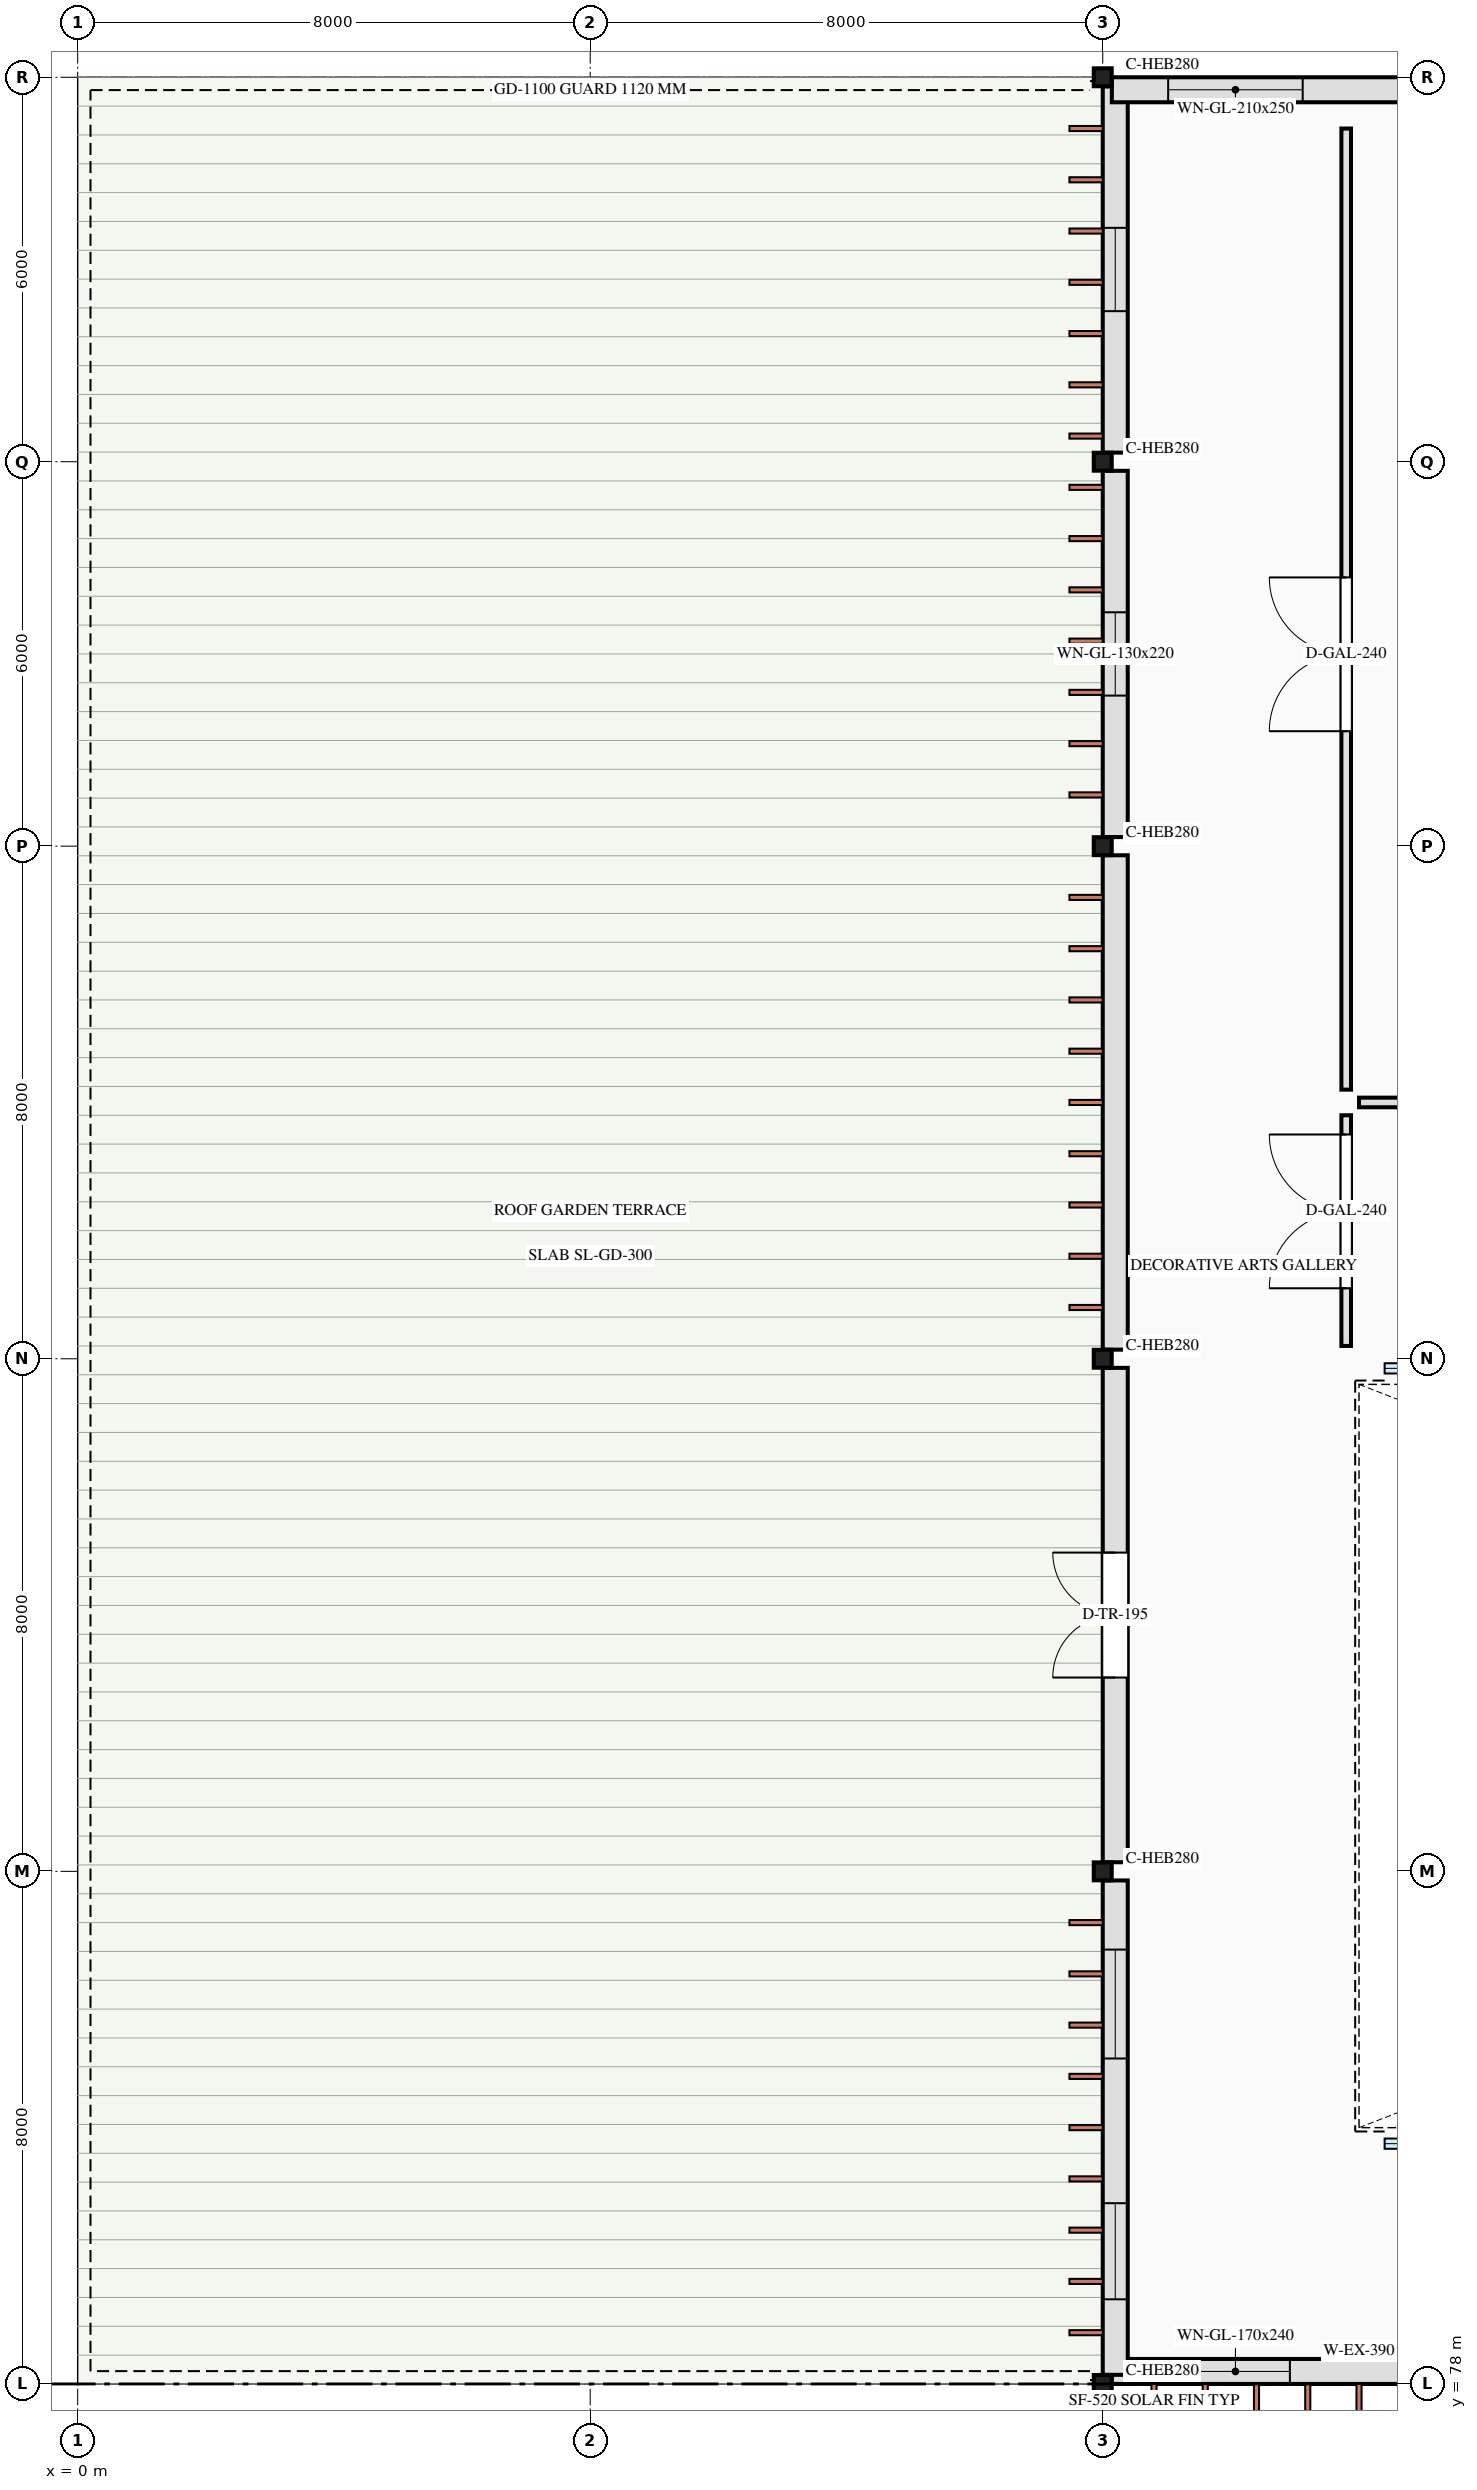
"""IFC4 building model, lengths in metres.
Left out: names, types, materials, properties, quantities, classifications, styles, units other than length and angle.
Written with IfcOpenShell. Run it as: python <this file> out.ifc"""

import sys

from ifc_helpers import new_model, si_unit, direction, frame, frame_2d, origin, origin_2d, place, context, subcontext, project, spatial, rectangle, i_section, extrude, element, fill, save


model = new_model("IFC4")
c1 = context("Model", 3, precision=1e-05, world=origin(), true_north=direction((0.0, 1.0)))
c2 = subcontext(c1, "Body", "Model", "MODEL_VIEW")
j1 = project(units=[si_unit("LENGTHUNIT", "METRE"), si_unit("PLANEANGLEUNIT", "RADIAN")], contexts=[c1])
p1 = place(None, origin())
s1 = spatial("IfcSite", under=j1, at=p1, CompositionType="ELEMENT")
p2 = place(p1, origin())
s2 = spatial("IfcBuilding", under=s1, at=p2, CompositionType="ELEMENT")
p3 = place(p2, frame((0.0, 0.0, 5.4)))
s3 = spatial("IfcBuildingStorey", under=s2, at=p3, CompositionType="ELEMENT", Elevation=5.4)
for number, where, z_axis, x_axis in (
    (1, (16.0, 78.0, 0.0), (0.0, 0.0, 1.0), (1.0, 0.0, 0.0)),
    (2, (16.0, 86.0, 0.0), (0.0, 0.0, 1.0), (1.0, 0.0, 0.0)),
    (3, (16.0, 94.0, 0.0), (0.0, 0.0, 1.0), (1.0, 0.0, 0.0)),
    (4, (16.0, 102.0, 0.0), (0.0, 0.0, 1.0), (1.0, 0.0, 0.0)),
    (5, (16.0, 108.0, 0.0), (0.0, 0.0, 1.0), (1.0, 0.0, 0.0)),
    (6, (16.0, 114.0, 0.0), (0.0, 0.0, 1.0), (1.0, 0.0, 0.0)),
):
    element("IfcColumn", number, at=place(p3, frame(where, z_axis=z_axis, x_axis=x_axis)), inside=s3, PredefinedType="COLUMN", context=c2, shape_type="SweptSolid", body=[
        extrude(i_section(OverallWidth=0.28, OverallDepth=0.28, WebThickness=0.01, FlangeThickness=0.018, FilletRadius=0.024, at=origin_2d()), origin(), (0.0, 0.0, 1.0), 4.2),
    ])
p4 = place(p3, frame((23.858, 78.195, 0.0), z_axis=(0.0, 0.0, 1.0), x_axis=(-1.0, 0.0, 0.0)))
e7 = element("IfcWall", 7, at=p4, inside=s3, PredefinedType="SOLIDWALL", context=c2, shape_type="SweptSolid", body=[
    extrude(rectangle(XDim=7.716, YDim=0.39, at=frame_2d((3.858, 0.0))), origin(), (0.0, 0.0, 1.0), 3.395),
])
p5 = place(p4, frame((1.179, 0.0, 0.85)))
e8 = element("IfcOpeningElement", 8, at=p5, cuts=e7, PredefinedType="OPENING", context=c2, shape_type="SweptSolid", body=[
    extrude(rectangle(XDim=1.5, YDim=2.4, at=frame_2d((0.75, 1.2))), frame((0.0, 0.205, 0.0), z_axis=(0.0, -1.0, 0.0), x_axis=(1.0, 0.0, 0.0)), (0.0, 0.0, 1.0), 0.41),
])
p6 = place(p4, frame((4.937, 0.0, 0.85)))
e9 = element("IfcOpeningElement", 9, at=p6, cuts=e7, PredefinedType="OPENING", context=c2, shape_type="SweptSolid", body=[
    extrude(rectangle(XDim=1.7, YDim=2.4, at=frame_2d((0.85, 1.2))), frame((0.0, 0.205, 0.0), z_axis=(0.0, -1.0, 0.0), x_axis=(1.0, 0.0, 0.0)), (0.0, 0.0, 1.0), 0.41),
])
p7 = place(p3, frame((16.195, 78.142, 0.0), z_axis=(0.0, 0.0, 1.0), x_axis=(0.0, 1.0, 0.0)))
e10 = element("IfcWall", 10, at=p7, inside=s3, PredefinedType="SOLIDWALL", context=c2, shape_type="SweptSolid", body=[
    extrude(rectangle(XDim=7.716, YDim=0.39, at=frame_2d((3.858, 0.0))), origin(), (0.0, 0.0, 1.0), 3.455),
])
p8 = place(p7, frame((1.179, 0.0, 0.85)))
e11 = element("IfcOpeningElement", 11, at=p8, cuts=e10, PredefinedType="OPENING", context=c2, shape_type="SweptSolid", body=[
    extrude(rectangle(XDim=1.5, YDim=2.4, at=frame_2d((0.75, 1.2))), frame((0.0, 0.205, 0.0), z_axis=(0.0, -1.0, 0.0), x_axis=(1.0, 0.0, 0.0)), (0.0, 0.0, 1.0), 0.41),
])
p9 = place(p7, frame((4.937, 0.0, 0.85)))
e12 = element("IfcOpeningElement", 12, at=p9, cuts=e10, PredefinedType="OPENING", context=c2, shape_type="SweptSolid", body=[
    extrude(rectangle(XDim=1.7, YDim=2.4, at=frame_2d((0.85, 1.2))), frame((0.0, 0.205, 0.0), z_axis=(0.0, -1.0, 0.0), x_axis=(1.0, 0.0, 0.0)), (0.0, 0.0, 1.0), 0.41),
])
p10 = place(p3, frame((16.195, 86.142, 0.0), z_axis=(0.0, 0.0, 1.0), x_axis=(0.0, 1.0, 0.0)))
e13 = element("IfcWall", 13, at=p10, inside=s3, PredefinedType="SOLIDWALL", context=c2, shape_type="SweptSolid", body=[
    extrude(rectangle(XDim=7.716, YDim=0.39, at=frame_2d((3.858, 0.0))), origin(), (0.0, 0.0, 1.0), 3.455),
])
p11 = place(p10, frame((2.883, 0.0, 0.0)))
e14 = element("IfcOpeningElement", 14, at=p11, cuts=e13, PredefinedType="OPENING", context=c2, shape_type="SweptSolid", body=[
    extrude(rectangle(XDim=1.95, YDim=2.35, at=frame_2d((0.975, 1.175))), frame((0.0, 0.205, 0.0), z_axis=(0.0, -1.0, 0.0), x_axis=(1.0, 0.0, 0.0)), (0.0, 0.0, 1.0), 0.41),
])
p12 = place(p3, frame((16.195, 94.142, 0.0), z_axis=(0.0, 0.0, 1.0), x_axis=(0.0, 1.0, 0.0)))
e15 = element("IfcWall", 15, at=p12, inside=s3, PredefinedType="SOLIDWALL", context=c2, shape_type="SweptSolid", body=[
    extrude(rectangle(XDim=7.716, YDim=0.39, at=frame_2d((3.858, 0.0))), origin(), (0.0, 0.0, 1.0), 3.455),
])
p13 = place(p3, frame((16.195, 102.142, 0.0), z_axis=(0.0, 0.0, 1.0), x_axis=(0.0, 1.0, 0.0)))
e16 = element("IfcWall", 16, at=p13, inside=s3, PredefinedType="SOLIDWALL", context=c2, shape_type="SweptSolid", body=[
    extrude(rectangle(XDim=5.716, YDim=0.39, at=frame_2d((2.858, 0.0))), origin(), (0.0, 0.0, 1.0), 3.455),
])
p14 = place(p13, frame((2.208, 0.0, 0.85)))
e17 = element("IfcOpeningElement", 17, at=p14, cuts=e16, PredefinedType="OPENING", context=c2, shape_type="SweptSolid", body=[
    extrude(rectangle(XDim=1.3, YDim=2.2, at=frame_2d((0.65, 1.1))), frame((0.0, 0.205, 0.0), z_axis=(0.0, -1.0, 0.0), x_axis=(1.0, 0.0, 0.0)), (0.0, 0.0, 1.0), 0.41),
])
p15 = place(p3, frame((16.195, 108.142, 0.0), z_axis=(0.0, 0.0, 1.0), x_axis=(0.0, 1.0, 0.0)))
e18 = element("IfcWall", 18, at=p15, inside=s3, PredefinedType="SOLIDWALL", context=c2, shape_type="SweptSolid", body=[
    extrude(rectangle(XDim=5.716, YDim=0.39, at=frame_2d((2.858, 0.0))), origin(), (0.0, 0.0, 1.0), 3.455),
])
p16 = place(p15, frame((2.208, 0.0, 0.85)))
e19 = element("IfcOpeningElement", 19, at=p16, cuts=e18, PredefinedType="OPENING", context=c2, shape_type="SweptSolid", body=[
    extrude(rectangle(XDim=1.3, YDim=2.2, at=frame_2d((0.65, 1.1))), frame((0.0, 0.205, 0.0), z_axis=(0.0, -1.0, 0.0), x_axis=(1.0, 0.0, 0.0)), (0.0, 0.0, 1.0), 0.41),
])
p17 = place(p3, frame((16.142, 113.805, 0.0), z_axis=(0.0, 0.0, 1.0), x_axis=(1.0, 0.0, 0.0)))
e20 = element("IfcWall", 20, at=p17, inside=s3, PredefinedType="SOLIDWALL", context=c2, shape_type="SweptSolid", body=[
    extrude(rectangle(XDim=7.716, YDim=0.39, at=frame_2d((3.858, 0.0))), origin(), (0.0, 0.0, 1.0), 3.455),
])
p18 = place(p17, frame((0.879, 0.0, 0.82)))
e21 = element("IfcOpeningElement", 21, at=p18, cuts=e20, PredefinedType="OPENING", context=c2, shape_type="SweptSolid", body=[
    extrude(rectangle(XDim=2.1, YDim=2.5, at=frame_2d((1.05, 1.25))), frame((0.0, 0.205, 0.0), z_axis=(0.0, -1.0, 0.0), x_axis=(1.0, 0.0, 0.0)), (0.0, 0.0, 1.0), 0.41),
])
p19 = place(p17, frame((4.587, 0.0, 0.72)))
e22 = element("IfcOpeningElement", 22, at=p19, cuts=e20, PredefinedType="OPENING", context=c2, shape_type="SweptSolid", body=[
    extrude(rectangle(XDim=2.4, YDim=2.6, at=frame_2d((1.2, 1.3))), frame((0.0, 0.205, 0.0), z_axis=(0.0, -1.0, 0.0), x_axis=(1.0, 0.0, 0.0)), (0.0, 0.0, 1.0), 0.41),
])
p20 = place(p3, frame((19.8, 94.2, 0.0), z_axis=(0.0, 0.0, 1.0), x_axis=(0.0, 1.0, 0.0)))
e23 = element("IfcWall", 23, at=p20, inside=s3, PredefinedType="PARTITIONING", context=c2, shape_type="SweptSolid", body=[
    extrude(rectangle(XDim=3.6, YDim=0.15, at=frame_2d((1.8, 0.0))), origin(), (0.0, 0.0, 1.0), 3.96),
])
p21 = place(p20, frame((0.9, 0.0, 0.0)))
e24 = element("IfcOpeningElement", 24, at=p21, cuts=e23, PredefinedType="OPENING", context=c2, shape_type="SweptSolid", body=[
    extrude(rectangle(XDim=2.4, YDim=2.75, at=frame_2d((1.2, 1.375))), frame((0.0, 0.085, 0.0), z_axis=(0.0, -1.0, 0.0), x_axis=(1.0, 0.0, 0.0)), (0.0, 0.0, 1.0), 0.17),
])
p22 = place(p3, frame((20.0, 98.0, 0.0), z_axis=(0.0, 0.0, 1.0), x_axis=(1.0, 0.0, 0.0)))
e25 = element("IfcWall", 25, at=p22, inside=s3, PredefinedType="PARTITIONING", context=c2, shape_type="SweptSolid", body=[
    extrude(rectangle(XDim=20.8, YDim=0.15, at=frame_2d((10.4, 0.0))), origin(), (0.0, 0.0, 1.0), 3.96),
])
p23 = place(p22, frame((7.043, 0.0, 0.0)))
e26 = element("IfcOpeningElement", 26, at=p23, cuts=e25, PredefinedType="OPENING", context=c2, shape_type="SweptSolid", body=[
    extrude(rectangle(XDim=2.1, YDim=2.6, at=frame_2d((1.05, 1.3))), frame((0.0, 0.085, 0.0), z_axis=(0.0, -1.0, 0.0), x_axis=(1.0, 0.0, 0.0)), (0.0, 0.0, 1.0), 0.17),
])
p24 = place(p3, frame((19.8, 98.2, 0.0), z_axis=(0.0, 0.0, 1.0), x_axis=(0.0, 1.0, 0.0)))
e27 = element("IfcWall", 27, at=p24, inside=s3, PredefinedType="PARTITIONING", context=c2, shape_type="SweptSolid", body=[
    extrude(rectangle(XDim=15.0, YDim=0.15, at=frame_2d((7.5, 0.0))), origin(), (0.0, 0.0, 1.0), 3.96),
])
p25 = place(p24, frame((5.594, 0.0, 0.0)))
e28 = element("IfcOpeningElement", 28, at=p25, cuts=e27, PredefinedType="OPENING", context=c2, shape_type="SweptSolid", body=[
    extrude(rectangle(XDim=2.4, YDim=2.75, at=frame_2d((1.2, 1.375))), frame((0.0, 0.085, 0.0), z_axis=(0.0, -1.0, 0.0), x_axis=(1.0, 0.0, 0.0)), (0.0, 0.0, 1.0), 0.17),
])
p26 = place(p6, origin())
e29 = element("IfcWindow", 29, at=p26, inside=s3, PartitioningType="DOUBLE_PANEL_VERTICAL", PredefinedType="WINDOW", context=c2, shape_type="SweptSolid", body=[
    extrude(rectangle(XDim=1.7, YDim=2.4, at=frame_2d((0.85, 1.2))), frame((0.0, 0.03, 0.0), z_axis=(0.0, -1.0, 0.0), x_axis=(1.0, 0.0, 0.0)), (0.0, 0.0, 1.0), 0.06),
])
fill(e9, e29)
p27 = place(p8, origin())
e30 = element("IfcWindow", 30, at=p27, inside=s3, PartitioningType="SINGLE_PANEL", PredefinedType="WINDOW", context=c2, shape_type="SweptSolid", body=[
    extrude(rectangle(XDim=1.5, YDim=2.4, at=frame_2d((0.75, 1.2))), frame((0.0, 0.03, 0.0), z_axis=(0.0, -1.0, 0.0), x_axis=(1.0, 0.0, 0.0)), (0.0, 0.0, 1.0), 0.06),
])
fill(e11, e30)
p28 = place(p9, origin())
e31 = element("IfcWindow", 31, at=p28, inside=s3, PartitioningType="DOUBLE_PANEL_VERTICAL", PredefinedType="WINDOW", context=c2, shape_type="SweptSolid", body=[
    extrude(rectangle(XDim=1.7, YDim=2.4, at=frame_2d((0.85, 1.2))), frame((0.0, 0.03, 0.0), z_axis=(0.0, -1.0, 0.0), x_axis=(1.0, 0.0, 0.0)), (0.0, 0.0, 1.0), 0.06),
])
fill(e12, e31)
p29 = place(p11, origin())
e32 = element("IfcDoor", 32, at=p29, inside=s3, OperationType="DOUBLE_DOOR_SINGLE_SWING", PredefinedType="DOOR", context=c2, shape_type="SweptSolid", body=[
    extrude(rectangle(XDim=1.95, YDim=2.35, at=frame_2d((0.975, 1.175))), frame((0.0, 0.025, 0.0), z_axis=(0.0, -1.0, 0.0), x_axis=(1.0, 0.0, 0.0)), (0.0, 0.0, 1.0), 0.05),
])
fill(e14, e32)
p30 = place(p14, origin())
e33 = element("IfcWindow", 33, at=p30, inside=s3, PartitioningType="SINGLE_PANEL", PredefinedType="WINDOW", context=c2, shape_type="SweptSolid", body=[
    extrude(rectangle(XDim=1.3, YDim=2.2, at=frame_2d((0.65, 1.1))), frame((0.0, 0.03, 0.0), z_axis=(0.0, -1.0, 0.0), x_axis=(1.0, 0.0, 0.0)), (0.0, 0.0, 1.0), 0.06),
])
fill(e17, e33)
p31 = place(p16, origin())
e34 = element("IfcWindow", 34, at=p31, inside=s3, PartitioningType="SINGLE_PANEL", PredefinedType="WINDOW", context=c2, shape_type="SweptSolid", body=[
    extrude(rectangle(XDim=1.3, YDim=2.2, at=frame_2d((0.65, 1.1))), frame((0.0, 0.03, 0.0), z_axis=(0.0, -1.0, 0.0), x_axis=(1.0, 0.0, 0.0)), (0.0, 0.0, 1.0), 0.06),
])
fill(e19, e34)
p32 = place(p18, origin())
e35 = element("IfcWindow", 35, at=p32, inside=s3, PartitioningType="DOUBLE_PANEL_VERTICAL", PredefinedType="WINDOW", context=c2, shape_type="SweptSolid", body=[
    extrude(rectangle(XDim=2.1, YDim=2.5, at=frame_2d((1.05, 1.25))), frame((0.0, 0.03, 0.0), z_axis=(0.0, -1.0, 0.0), x_axis=(1.0, 0.0, 0.0)), (0.0, 0.0, 1.0), 0.06),
])
fill(e21, e35)
p33 = place(p21, origin())
e36 = element("IfcDoor", 36, at=p33, inside=s3, OperationType="DOUBLE_DOOR_DOUBLE_SWING", PredefinedType="DOOR", context=c2, shape_type="SweptSolid", body=[
    extrude(rectangle(XDim=2.4, YDim=2.75, at=frame_2d((1.2, 1.375))), frame((0.0, 0.025, 0.0), z_axis=(0.0, -1.0, 0.0), x_axis=(1.0, 0.0, 0.0)), (0.0, 0.0, 1.0), 0.05),
])
fill(e24, e36)
p34 = place(p25, origin())
e37 = element("IfcDoor", 37, at=p34, inside=s3, OperationType="DOUBLE_DOOR_DOUBLE_SWING", PredefinedType="DOOR", context=c2, shape_type="SweptSolid", body=[
    extrude(rectangle(XDim=2.4, YDim=2.75, at=frame_2d((1.2, 1.375))), frame((0.0, 0.025, 0.0), z_axis=(0.0, -1.0, 0.0), x_axis=(1.0, 0.0, 0.0)), (0.0, 0.0, 1.0), 0.05),
])
fill(e28, e37)
save(model, sys.argv[1])
